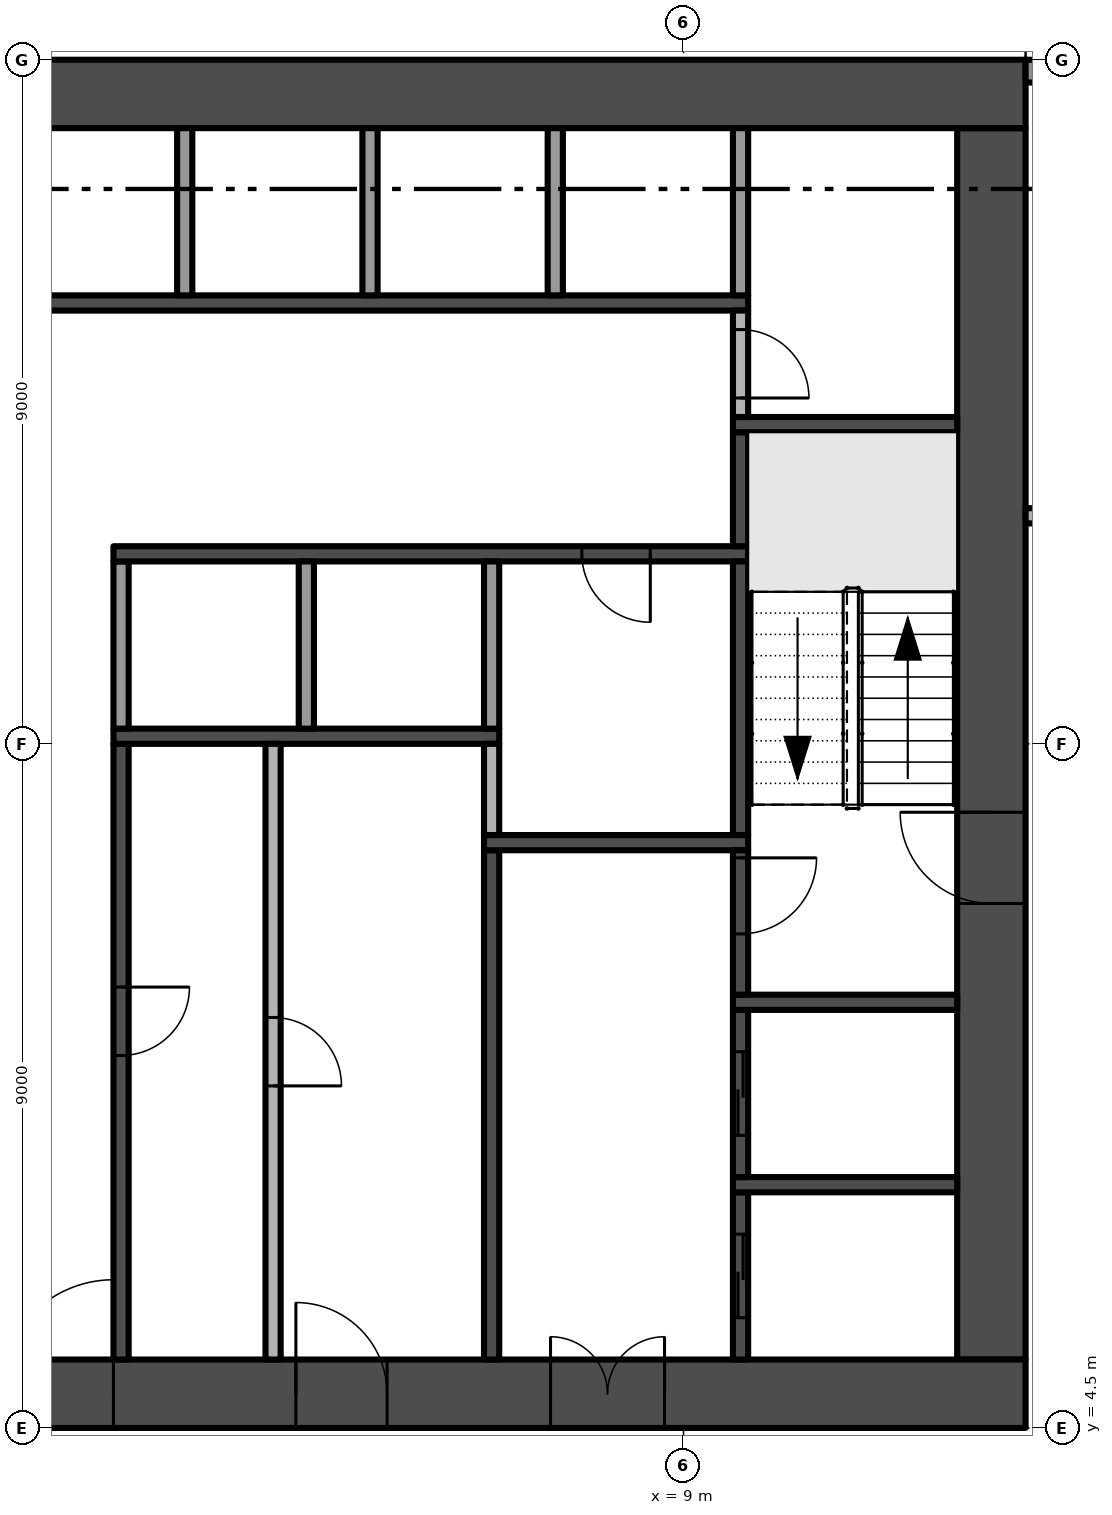
"""IFC4 building model, lengths in metres.
Left out: names, types, materials, properties, quantities, classifications, styles, units other than length and angle.
Written with IfcOpenShell. Run it as: python <this file> out.ifc"""

import sys

from ifc_helpers import new_model, si_unit, direction, frame, frame_2d, origin, place, context, subcontext, project, spatial, rectangle, extrude, element, fill, save


model = new_model("IFC4")
c1 = context("Model", 3, precision=1e-05, world=origin(), true_north=direction((0.0, 1.0)))
c2 = subcontext(c1, "Body", "Model", "MODEL_VIEW")
j1 = project(units=[si_unit("LENGTHUNIT", "METRE"), si_unit("PLANEANGLEUNIT", "RADIAN")], contexts=[c1])
p1 = place(None, origin())
s1 = spatial("IfcSite", under=j1, at=p1, CompositionType="ELEMENT")
p2 = place(p1, origin())
s2 = spatial("IfcBuilding", under=s1, at=p2, CompositionType="ELEMENT")
p3 = place(p2, frame((0.0, 0.0, 56.8)))
s3 = spatial("IfcBuildingStorey", under=s2, at=p3, CompositionType="ELEMENT", Elevation=56.8)
p4 = place(p3, frame((-13.5, 4.95, -0.3), z_axis=(0.0, 0.0, 1.0), x_axis=(1.0, 0.0, 0.0)))
e1 = element("IfcWall", 1, at=p4, inside=s3, PredefinedType="SHEAR", context=c2, shape_type="SweptSolid", body=[
    extrude(rectangle(XDim=27.0, YDim=0.9, at=frame_2d((13.5, 0.0))), origin(), (0.0, 0.0, 1.0), 3.8),
])
p5 = place(p4, frame((12.0, 0.0, 0.3)))
e2 = element("IfcOpeningElement", 2, at=p5, cuts=e1, PredefinedType="OPENING", context=c2, shape_type="SweptSolid", body=[
    extrude(rectangle(XDim=3.0, YDim=2.4, at=frame_2d((1.5, 1.2))), frame((0.0, 0.46, 0.0), z_axis=(0.0, -1.0, 0.0), x_axis=(1.0, 0.0, 0.0)), (0.0, 0.0, 1.0), 0.92),
])
p6 = place(p4, frame((4.9, 0.0, 0.3)))
e3 = element("IfcOpeningElement", 3, at=p6, cuts=e1, PredefinedType="OPENING", context=c2, shape_type="SweptSolid", body=[
    extrude(rectangle(XDim=1.2, YDim=2.2, at=frame_2d((0.6, 1.1))), frame((0.0, 0.46, 0.0), z_axis=(0.0, -1.0, 0.0), x_axis=(1.0, 0.0, 0.0)), (0.0, 0.0, 1.0), 0.92),
])
p7 = place(p4, frame((20.75, 0.0, 0.3)))
e4 = element("IfcOpeningElement", 4, at=p7, cuts=e1, PredefinedType="OPENING", context=c2, shape_type="SweptSolid", body=[
    extrude(rectangle(XDim=1.5, YDim=2.2, at=frame_2d((0.75, 1.1))), frame((0.0, 0.46, 0.0), z_axis=(0.0, -1.0, 0.0), x_axis=(1.0, 0.0, 0.0)), (0.0, 0.0, 1.0), 0.92),
])
p8 = place(p4, frame((17.4, 0.0, 0.3)))
e5 = element("IfcOpeningElement", 5, at=p8, cuts=e1, PredefinedType="OPENING", context=c2, shape_type="SweptSolid", body=[
    extrude(rectangle(XDim=1.2, YDim=2.2, at=frame_2d((0.6, 1.1))), frame((0.0, 0.46, 0.0), z_axis=(0.0, -1.0, 0.0), x_axis=(1.0, 0.0, 0.0)), (0.0, 0.0, 1.0), 0.92),
])
p9 = place(p3, frame((13.05, 5.4, -0.3), z_axis=(0.0, 0.0, 1.0), x_axis=(0.0, 1.0, 0.0)))
e6 = element("IfcWall", 6, at=p9, inside=s3, PredefinedType="SHEAR", context=c2, shape_type="SweptSolid", body=[
    extrude(rectangle(XDim=16.2, YDim=0.9, at=frame_2d((8.1, 0.0))), origin(), (0.0, 0.0, 1.0), 3.8),
])
p10 = place(p9, frame((6.0, 0.0, 0.3)))
e7 = element("IfcOpeningElement", 7, at=p10, cuts=e6, PredefinedType="OPENING", context=c2, shape_type="SweptSolid", body=[
    extrude(rectangle(XDim=1.2, YDim=2.2, at=frame_2d((0.6, 1.1))), frame((0.0, 0.46, 0.0), z_axis=(0.0, -1.0, 0.0), x_axis=(1.0, 0.0, 0.0)), (0.0, 0.0, 1.0), 0.92),
])
p11 = place(p3, frame((13.5, 22.05, -0.3), z_axis=(0.0, 0.0, 1.0), x_axis=(-1.0, 0.0, 0.0)))
e8 = element("IfcWall", 8, at=p11, inside=s3, PredefinedType="SHEAR", context=c2, shape_type="SweptSolid", body=[
    extrude(rectangle(XDim=27.0, YDim=0.9, at=frame_2d((13.5, 0.0))), origin(), (0.0, 0.0, 1.0), 3.8),
])
p12 = place(p3, frame((13.5, 22.35, 0.0), z_axis=(0.0, 0.0, 1.0), x_axis=(1.0, 0.0, 0.0)))
e9 = element("IfcWall", 9, at=p12, inside=s3, PredefinedType="SOLIDWALL", context=c2, shape_type="SweptSolid", body=[
    extrude(rectangle(XDim=3.8, YDim=0.3, at=frame_2d((1.9, 0.0))), origin(), (0.0, 0.0, 1.0), 3.5),
])
p13 = place(p12, frame((0.85, 0.0, 0.45)))
e10 = element("IfcOpeningElement", 10, at=p13, cuts=e9, PredefinedType="OPENING", context=c2, shape_type="SweptSolid", body=[
    extrude(rectangle(XDim=2.65, YDim=2.65, at=frame_2d((1.325, 1.325))), frame((0.0, 0.16, 0.0), z_axis=(0.0, -1.0, 0.0), x_axis=(1.0, 0.0, 0.0)), (0.0, 0.0, 1.0), 0.32),
])
p14 = place(p3, frame((-9.85, 19.3, 0.0), z_axis=(0.0, 0.0, 1.0), x_axis=(1.0, 0.0, 0.0)))
e11 = element("IfcWall", 11, at=p14, inside=s3, PredefinedType="SHEAR", context=c2, shape_type="SweptSolid", body=[
    extrude(rectangle(XDim=19.7, YDim=0.2, at=frame_2d((9.85, 0.0))), origin(), (0.0, 0.0, 1.0), 3.5),
])
p15 = place(p14, frame((0.769, 0.0, 0.0)))
e12 = element("IfcOpeningElement", 12, at=p15, cuts=e11, PredefinedType="OPENING", context=c2, shape_type="SweptSolid", body=[
    extrude(rectangle(XDim=1.1, YDim=2.1, at=frame_2d((0.55, 1.05))), frame((0.0, 0.11, 0.0), z_axis=(0.0, -1.0, 0.0), x_axis=(1.0, 0.0, 0.0)), (0.0, 0.0, 1.0), 0.22),
])
p16 = place(p14, frame((3.206, 0.0, 0.0)))
e13 = element("IfcOpeningElement", 13, at=p16, cuts=e11, PredefinedType="OPENING", context=c2, shape_type="SweptSolid", body=[
    extrude(rectangle(XDim=1.1, YDim=2.1, at=frame_2d((0.55, 1.05))), frame((0.0, 0.11, 0.0), z_axis=(0.0, -1.0, 0.0), x_axis=(1.0, 0.0, 0.0)), (0.0, 0.0, 1.0), 0.22),
])
p17 = place(p14, frame((5.644, 0.0, 0.0)))
e14 = element("IfcOpeningElement", 14, at=p17, cuts=e11, PredefinedType="OPENING", context=c2, shape_type="SweptSolid", body=[
    extrude(rectangle(XDim=1.1, YDim=2.1, at=frame_2d((0.55, 1.05))), frame((0.0, 0.11, 0.0), z_axis=(0.0, -1.0, 0.0), x_axis=(1.0, 0.0, 0.0)), (0.0, 0.0, 1.0), 0.22),
])
p18 = place(p14, frame((8.081, 0.0, 0.0)))
e15 = element("IfcOpeningElement", 15, at=p18, cuts=e11, PredefinedType="OPENING", context=c2, shape_type="SweptSolid", body=[
    extrude(rectangle(XDim=1.1, YDim=2.1, at=frame_2d((0.55, 1.05))), frame((0.0, 0.11, 0.0), z_axis=(0.0, -1.0, 0.0), x_axis=(1.0, 0.0, 0.0)), (0.0, 0.0, 1.0), 0.22),
])
p19 = place(p3, frame((1.6, 13.5, 0.0), z_axis=(0.0, 0.0, 1.0), x_axis=(0.0, -1.0, 0.0)))
e16 = element("IfcWall", 16, at=p19, inside=s3, PredefinedType="SHEAR", context=c2, shape_type="SweptSolid", body=[
    extrude(rectangle(XDim=8.1, YDim=0.2, at=frame_2d((4.05, 0.0))), origin(), (0.0, 0.0, 1.0), 3.5),
])
p20 = place(p19, frame((3.2, 0.0, 0.0)))
e17 = element("IfcOpeningElement", 17, at=p20, cuts=e16, PredefinedType="OPENING", context=c2, shape_type="SweptSolid", body=[
    extrude(rectangle(XDim=0.9, YDim=2.1, at=frame_2d((0.45, 1.05))), frame((0.0, 0.11, 0.0), z_axis=(0.0, -1.0, 0.0), x_axis=(1.0, 0.0, 0.0)), (0.0, 0.0, 1.0), 0.22),
])
p21 = place(p3, frame((1.5, 13.6, 0.0), z_axis=(0.0, 0.0, 1.0), x_axis=(1.0, 0.0, 0.0)))
e18 = element("IfcWall", 18, at=p21, inside=s3, PredefinedType="SHEAR", context=c2, shape_type="SweptSolid", body=[
    extrude(rectangle(XDim=5.075, YDim=0.2, at=frame_2d((2.538, 0.0))), origin(), (0.0, 0.0, 1.0), 3.5),
])
p22 = place(p3, frame((1.6, 13.7, 0.0), z_axis=(0.0, 0.0, 1.0), x_axis=(0.0, 1.0, 0.0)))
e19 = element("IfcWall", 19, at=p22, inside=s3, PredefinedType="PARTITIONING", context=c2, shape_type="SweptSolid", body=[
    extrude(rectangle(XDim=2.2, YDim=0.2, at=frame_2d((1.1, 0.0))), origin(), (0.0, 0.0, 1.0), 3.5),
])
p23 = place(p3, frame((9.85, 16.0, 0.0), z_axis=(0.0, 0.0, 1.0), x_axis=(-1.0, 0.0, 0.0)))
e20 = element("IfcWall", 20, at=p23, inside=s3, PredefinedType="SHEAR", context=c2, shape_type="SweptSolid", body=[
    extrude(rectangle(XDim=8.35, YDim=0.2, at=frame_2d((4.175, 0.0))), origin(), (0.0, 0.0, 1.0), 3.5),
])
p24 = place(p23, frame((1.288, 0.0, 0.0)))
e21 = element("IfcOpeningElement", 21, at=p24, cuts=e20, PredefinedType="OPENING", context=c2, shape_type="SweptSolid", body=[
    extrude(rectangle(XDim=0.9, YDim=2.1, at=frame_2d((0.45, 1.05))), frame((0.0, 0.11, 0.0), z_axis=(0.0, -1.0, 0.0), x_axis=(1.0, 0.0, 0.0)), (0.0, 0.0, 1.0), 0.22),
])
p25 = place(p3, frame((2.438, 19.4, 0.0), z_axis=(0.0, 0.0, 1.0), x_axis=(0.0, 1.0, 0.0)))
e22 = element("IfcWall", 22, at=p25, inside=s3, PredefinedType="PARTITIONING", context=c2, shape_type="SweptSolid", body=[
    extrude(rectangle(XDim=2.2, YDim=0.2, at=frame_2d((1.1, 0.0))), origin(), (0.0, 0.0, 1.0), 3.5),
])
p26 = place(p3, frame((3.6, 13.5, 0.0), z_axis=(0.0, 0.0, 1.0), x_axis=(0.0, -1.0, 0.0)))
e23 = element("IfcWall", 23, at=p26, inside=s3, PredefinedType="PARTITIONING", context=c2, shape_type="SweptSolid", body=[
    extrude(rectangle(XDim=8.1, YDim=0.2, at=frame_2d((4.05, 0.0))), origin(), (0.0, 0.0, 1.0), 3.5),
])
p27 = place(p26, frame((3.6, 0.0, 0.0)))
e24 = element("IfcOpeningElement", 24, at=p27, cuts=e23, PredefinedType="OPENING", context=c2, shape_type="SweptSolid", body=[
    extrude(rectangle(XDim=0.9, YDim=2.1, at=frame_2d((0.45, 1.05))), frame((0.0, 0.11, 0.0), z_axis=(0.0, -1.0, 0.0), x_axis=(1.0, 0.0, 0.0)), (0.0, 0.0, 1.0), 0.22),
])
for number, where, z_axis, x_axis in (
    (25, (4.037, 13.7, 0.0), (0.0, 0.0, 1.0), (0.0, 1.0, 0.0)),
    (26, (4.875, 19.4, 0.0), (0.0, 0.0, 1.0), (0.0, 1.0, 0.0)),
):
    element("IfcWall", number, at=place(p3, frame(where, z_axis=z_axis, x_axis=x_axis)), inside=s3, PredefinedType="PARTITIONING", context=c2, shape_type="SweptSolid", body=[
        extrude(rectangle(XDim=2.2, YDim=0.2, at=frame_2d((1.1, 0.0))), origin(), (0.0, 0.0, 1.0), 3.5),
    ])
p28 = place(p3, frame((6.475, 5.4, 0.0), z_axis=(0.0, 0.0, 1.0), x_axis=(0.0, 1.0, 0.0)))
e27 = element("IfcWall", 27, at=p28, inside=s3, PredefinedType="SHEAR", context=c2, shape_type="SweptSolid", body=[
    extrude(rectangle(XDim=6.7, YDim=0.2, at=frame_2d((3.35, 0.0))), origin(), (0.0, 0.0, 1.0), 3.5),
])
p29 = place(p3, frame((6.375, 12.2, 0.0), z_axis=(0.0, 0.0, 1.0), x_axis=(1.0, 0.0, 0.0)))
e28 = element("IfcWall", 28, at=p29, inside=s3, PredefinedType="SHEAR", context=c2, shape_type="SweptSolid", body=[
    extrude(rectangle(XDim=3.475, YDim=0.2, at=frame_2d((1.738, 0.0))), origin(), (0.0, 0.0, 1.0), 3.5),
])
p30 = place(p3, frame((6.475, 12.3, 0.0), z_axis=(0.0, 0.0, 1.0), x_axis=(0.0, 1.0, 0.0)))
e29 = element("IfcWall", 29, at=p30, inside=s3, PredefinedType="PARTITIONING", context=c2, shape_type="SweptSolid", body=[
    extrude(rectangle(XDim=1.2, YDim=0.2, at=frame_2d((0.6, 0.0))), origin(), (0.0, 0.0, 1.0), 3.5),
])
for number, where, z_axis, x_axis in (
    (30, (6.475, 13.7, 0.0), (0.0, 0.0, 1.0), (0.0, 1.0, 0.0)),
    (31, (7.312, 19.4, 0.0), (0.0, 0.0, 1.0), (0.0, 1.0, 0.0)),
):
    element("IfcWall", number, at=place(p3, frame(where, z_axis=z_axis, x_axis=x_axis)), inside=s3, PredefinedType="PARTITIONING", context=c2, shape_type="SweptSolid", body=[
        extrude(rectangle(XDim=2.2, YDim=0.2, at=frame_2d((1.1, 0.0))), origin(), (0.0, 0.0, 1.0), 3.5),
    ])
p31 = place(p3, frame((9.75, 5.4, 0.0), z_axis=(0.0, 0.0, 1.0), x_axis=(0.0, 1.0, 0.0)))
e32 = element("IfcWall", 32, at=p31, inside=s3, PredefinedType="SHEAR", context=c2, shape_type="SweptSolid", body=[
    extrude(rectangle(XDim=2.2, YDim=0.2, at=frame_2d((1.1, 0.0))), origin(), (0.0, 0.0, 1.0), 3.5),
])
p32 = place(p31, frame((0.55, 0.0, 0.0)))
e33 = element("IfcOpeningElement", 33, at=p32, cuts=e32, PredefinedType="OPENING", context=c2, shape_type="SweptSolid", body=[
    extrude(rectangle(XDim=1.1, YDim=2.1, at=frame_2d((0.55, 1.05))), frame((0.0, 0.11, 0.0), z_axis=(0.0, -1.0, 0.0), x_axis=(1.0, 0.0, 0.0)), (0.0, 0.0, 1.0), 0.22),
])
p33 = place(p3, frame((9.65, 7.7, 0.0), z_axis=(0.0, 0.0, 1.0), x_axis=(1.0, 0.0, 0.0)))
e34 = element("IfcWall", 34, at=p33, inside=s3, PredefinedType="SHEAR", context=c2, shape_type="SweptSolid", body=[
    extrude(rectangle(XDim=2.95, YDim=0.2, at=frame_2d((1.475, 0.0))), origin(), (0.0, 0.0, 1.0), 3.5),
])
p34 = place(p3, frame((9.75, 7.8, 0.0), z_axis=(0.0, 0.0, 1.0), x_axis=(0.0, 1.0, 0.0)))
e35 = element("IfcWall", 35, at=p34, inside=s3, PredefinedType="SHEAR", context=c2, shape_type="SweptSolid", body=[
    extrude(rectangle(XDim=2.2, YDim=0.2, at=frame_2d((1.1, 0.0))), origin(), (0.0, 0.0, 1.0), 3.5),
])
p35 = place(p34, frame((0.55, 0.0, 0.0)))
e36 = element("IfcOpeningElement", 36, at=p35, cuts=e35, PredefinedType="OPENING", context=c2, shape_type="SweptSolid", body=[
    extrude(rectangle(XDim=1.1, YDim=2.1, at=frame_2d((0.55, 1.05))), frame((0.0, 0.11, 0.0), z_axis=(0.0, -1.0, 0.0), x_axis=(1.0, 0.0, 0.0)), (0.0, 0.0, 1.0), 0.22),
])
p36 = place(p3, frame((9.65, 10.1, 0.0), z_axis=(0.0, 0.0, 1.0), x_axis=(1.0, 0.0, 0.0)))
e37 = element("IfcWall", 37, at=p36, inside=s3, PredefinedType="SHEAR", context=c2, shape_type="SweptSolid", body=[
    extrude(rectangle(XDim=2.95, YDim=0.2, at=frame_2d((1.475, 0.0))), origin(), (0.0, 0.0, 1.0), 3.5),
])
p37 = place(p3, frame((9.75, 12.1, 0.0), z_axis=(0.0, 0.0, 1.0), x_axis=(0.0, -1.0, 0.0)))
e38 = element("IfcWall", 38, at=p37, inside=s3, PredefinedType="SHEAR", context=c2, shape_type="SweptSolid", body=[
    extrude(rectangle(XDim=1.9, YDim=0.2, at=frame_2d((0.95, 0.0))), origin(), (0.0, 0.0, 1.0), 3.5),
])
p38 = place(p37, frame((0.1, 0.0, 0.0)))
e39 = element("IfcOpeningElement", 39, at=p38, cuts=e38, PredefinedType="OPENING", context=c2, shape_type="SweptSolid", body=[
    extrude(rectangle(XDim=1.0, YDim=2.2, at=frame_2d((0.5, 1.1))), frame((0.0, 0.11, 0.0), z_axis=(0.0, -1.0, 0.0), x_axis=(1.0, 0.0, 0.0)), (0.0, 0.0, 1.0), 0.22),
])
p39 = place(p3, frame((9.75, 12.3, 0.0), z_axis=(0.0, 0.0, 1.0), x_axis=(0.0, 1.0, 0.0)))
e40 = element("IfcWall", 40, at=p39, inside=s3, PredefinedType="SHEAR", context=c2, shape_type="SweptSolid", body=[
    extrude(rectangle(XDim=3.6, YDim=0.2, at=frame_2d((1.8, 0.0))), origin(), (0.0, 0.0, 1.0), 3.5),
])
p40 = place(p3, frame((9.75, 16.1, 0.0), z_axis=(0.0, 0.0, 1.0), x_axis=(0.0, 1.0, 0.0)))
e41 = element("IfcWall", 41, at=p40, inside=s3, PredefinedType="SHEAR", context=c2, shape_type="SweptSolid", body=[
    extrude(rectangle(XDim=1.5, YDim=0.2, at=frame_2d((0.75, 0.0))), origin(), (0.0, 0.0, 1.0), 3.5),
])
p41 = place(p3, frame((9.65, 17.7, 0.0), z_axis=(0.0, 0.0, 1.0), x_axis=(1.0, 0.0, 0.0)))
e42 = element("IfcWall", 42, at=p41, inside=s3, PredefinedType="SHEAR", context=c2, shape_type="SweptSolid", body=[
    extrude(rectangle(XDim=2.95, YDim=0.2, at=frame_2d((1.475, 0.0))), origin(), (0.0, 0.0, 1.0), 3.5),
])
p42 = place(p3, frame((9.75, 19.2, 0.0), z_axis=(0.0, 0.0, 1.0), x_axis=(0.0, -1.0, 0.0)))
e43 = element("IfcWall", 43, at=p42, inside=s3, PredefinedType="PARTITIONING", context=c2, shape_type="SweptSolid", body=[
    extrude(rectangle(XDim=1.4, YDim=0.2, at=frame_2d((0.7, 0.0))), origin(), (0.0, 0.0, 1.0), 3.5),
])
p43 = place(p42, frame((0.25, 0.0, 0.0)))
e44 = element("IfcOpeningElement", 44, at=p43, cuts=e43, PredefinedType="OPENING", context=c2, shape_type="SweptSolid", body=[
    extrude(rectangle(XDim=0.9, YDim=2.1, at=frame_2d((0.45, 1.05))), frame((0.0, 0.11, 0.0), z_axis=(0.0, -1.0, 0.0), x_axis=(1.0, 0.0, 0.0)), (0.0, 0.0, 1.0), 0.22),
])
p44 = place(p3, frame((9.75, 19.4, 0.0), z_axis=(0.0, 0.0, 1.0), x_axis=(0.0, 1.0, 0.0)))
e45 = element("IfcWall", 45, at=p44, inside=s3, PredefinedType="PARTITIONING", context=c2, shape_type="SweptSolid", body=[
    extrude(rectangle(XDim=2.2, YDim=0.2, at=frame_2d((1.1, 0.0))), origin(), (0.0, 0.0, 1.0), 3.5),
])
p45 = place(p3, frame((13.5, 16.5, 0.0), z_axis=(0.0, 0.0, 1.0), x_axis=(1.0, 0.0, 0.0)))
e46 = element("IfcWall", 46, at=p45, inside=s3, PredefinedType="PARTITIONING", context=c2, shape_type="SweptSolid", body=[
    extrude(rectangle(XDim=3.825, YDim=0.2, at=frame_2d((1.913, 0.0))), origin(), (0.0, 0.0, 1.0), 3.5),
])
p46 = place(p45, frame((1.55, 0.0, 0.0)))
e47 = element("IfcOpeningElement", 47, at=p46, cuts=e46, PredefinedType="OPENING", context=c2, shape_type="SweptSolid", body=[
    extrude(rectangle(XDim=0.9, YDim=2.1, at=frame_2d((0.45, 1.05))), frame((0.0, 0.11, 0.0), z_axis=(0.0, -1.0, 0.0), x_axis=(1.0, 0.0, 0.0)), (0.0, 0.0, 1.0), 0.22),
])
p47 = place(p5, frame((3.0, 0.0, 0.0), z_axis=(0.0, 0.0, 1.0), x_axis=(-1.0, 0.0, 0.0)))
e48 = element("IfcDoor", 48, at=p47, inside=s3, OperationType="DOUBLE_DOOR_SINGLE_SWING", PredefinedType="DOOR", context=c2, shape_type="SweptSolid", body=[
    extrude(rectangle(XDim=3.0, YDim=2.4, at=frame_2d((1.5, 1.2))), frame((0.0, 0.025, 0.0), z_axis=(0.0, -1.0, 0.0), x_axis=(1.0, 0.0, 0.0)), (0.0, 0.0, 1.0), 0.05),
])
fill(e2, e48)
p48 = place(p10, frame((1.2, 0.0, 0.0), z_axis=(0.0, 0.0, 1.0), x_axis=(-1.0, 0.0, 0.0)))
e49 = element("IfcDoor", 49, at=p48, inside=s3, OperationType="SINGLE_SWING_LEFT", PredefinedType="DOOR", context=c2, shape_type="SweptSolid", body=[
    extrude(rectangle(XDim=1.2, YDim=2.2, at=frame_2d((0.6, 1.1))), frame((0.0, 0.025, 0.0), z_axis=(0.0, -1.0, 0.0), x_axis=(1.0, 0.0, 0.0)), (0.0, 0.0, 1.0), 0.05),
])
fill(e7, e49)
p49 = place(p7, frame((1.5, 0.0, 0.0), z_axis=(0.0, 0.0, 1.0), x_axis=(-1.0, 0.0, 0.0)))
e50 = element("IfcDoor", 50, at=p49, inside=s3, OperationType="DOUBLE_DOOR_SINGLE_SWING", PredefinedType="DOOR", context=c2, shape_type="SweptSolid", body=[
    extrude(rectangle(XDim=1.5, YDim=2.2, at=frame_2d((0.75, 1.1))), frame((0.0, 0.025, 0.0), z_axis=(0.0, -1.0, 0.0), x_axis=(1.0, 0.0, 0.0)), (0.0, 0.0, 1.0), 0.05),
])
fill(e4, e50)
p50 = place(p8, frame((1.2, 0.0, 0.0), z_axis=(0.0, 0.0, 1.0), x_axis=(-1.0, 0.0, 0.0)))
e51 = element("IfcDoor", 51, at=p50, inside=s3, OperationType="SINGLE_SWING_RIGHT", PredefinedType="DOOR", context=c2, shape_type="SweptSolid", body=[
    extrude(rectangle(XDim=1.2, YDim=2.2, at=frame_2d((0.6, 1.1))), frame((0.0, 0.025, 0.0), z_axis=(0.0, -1.0, 0.0), x_axis=(1.0, 0.0, 0.0)), (0.0, 0.0, 1.0), 0.05),
])
fill(e5, e51)
p51 = place(p38, origin())
e52 = element("IfcDoor", 52, at=p51, inside=s3, OperationType="SINGLE_SWING_LEFT", PredefinedType="DOOR", context=c2, shape_type="SweptSolid", body=[
    extrude(rectangle(XDim=1.0, YDim=2.2, at=frame_2d((0.5, 1.1))), frame((0.0, 0.025, 0.0), z_axis=(0.0, -1.0, 0.0), x_axis=(1.0, 0.0, 0.0)), (0.0, 0.0, 1.0), 0.05),
])
fill(e39, e52)
p52 = place(p32, origin())
e53 = element("IfcDoor", 53, at=p52, inside=s3, OperationType="SLIDING_TO_RIGHT", PredefinedType="DOOR", context=c2, shape_type="SweptSolid", body=[
    extrude(rectangle(XDim=1.1, YDim=2.1, at=frame_2d((0.55, 1.05))), frame((0.0, 0.025, 0.0), z_axis=(0.0, -1.0, 0.0), x_axis=(1.0, 0.0, 0.0)), (0.0, 0.0, 1.0), 0.05),
])
fill(e33, e53)
p53 = place(p35, origin())
e54 = element("IfcDoor", 54, at=p53, inside=s3, OperationType="SLIDING_TO_RIGHT", PredefinedType="DOOR", context=c2, shape_type="SweptSolid", body=[
    extrude(rectangle(XDim=1.1, YDim=2.1, at=frame_2d((0.55, 1.05))), frame((0.0, 0.025, 0.0), z_axis=(0.0, -1.0, 0.0), x_axis=(1.0, 0.0, 0.0)), (0.0, 0.0, 1.0), 0.05),
])
fill(e36, e54)
p54 = place(p20, origin())
e55 = element("IfcDoor", 55, at=p54, inside=s3, OperationType="SINGLE_SWING_LEFT", PredefinedType="DOOR", context=c2, shape_type="SweptSolid", body=[
    extrude(rectangle(XDim=0.9, YDim=2.1, at=frame_2d((0.45, 1.05))), frame((0.0, 0.025, 0.0), z_axis=(0.0, -1.0, 0.0), x_axis=(1.0, 0.0, 0.0)), (0.0, 0.0, 1.0), 0.05),
])
fill(e17, e55)
p55 = place(p24, origin())
e56 = element("IfcDoor", 56, at=p55, inside=s3, OperationType="SINGLE_SWING_LEFT", PredefinedType="DOOR", context=c2, shape_type="SweptSolid", body=[
    extrude(rectangle(XDim=0.9, YDim=2.1, at=frame_2d((0.45, 1.05))), frame((0.0, 0.025, 0.0), z_axis=(0.0, -1.0, 0.0), x_axis=(1.0, 0.0, 0.0)), (0.0, 0.0, 1.0), 0.05),
])
fill(e21, e56)
p56 = place(p43, origin())
e57 = element("IfcDoor", 57, at=p56, inside=s3, OperationType="SINGLE_SWING_RIGHT", PredefinedType="DOOR", context=c2, shape_type="SweptSolid", body=[
    extrude(rectangle(XDim=0.9, YDim=2.1, at=frame_2d((0.45, 1.05))), frame((0.0, 0.025, 0.0), z_axis=(0.0, -1.0, 0.0), x_axis=(1.0, 0.0, 0.0)), (0.0, 0.0, 1.0), 0.05),
])
fill(e44, e57)
p57 = place(p27, origin())
e58 = element("IfcDoor", 58, at=p57, inside=s3, OperationType="SINGLE_SWING_RIGHT", PredefinedType="DOOR", context=c2, shape_type="SweptSolid", body=[
    extrude(rectangle(XDim=0.9, YDim=2.1, at=frame_2d((0.45, 1.05))), frame((0.0, 0.025, 0.0), z_axis=(0.0, -1.0, 0.0), x_axis=(1.0, 0.0, 0.0)), (0.0, 0.0, 1.0), 0.05),
])
fill(e24, e58)
save(model, sys.argv[1])
